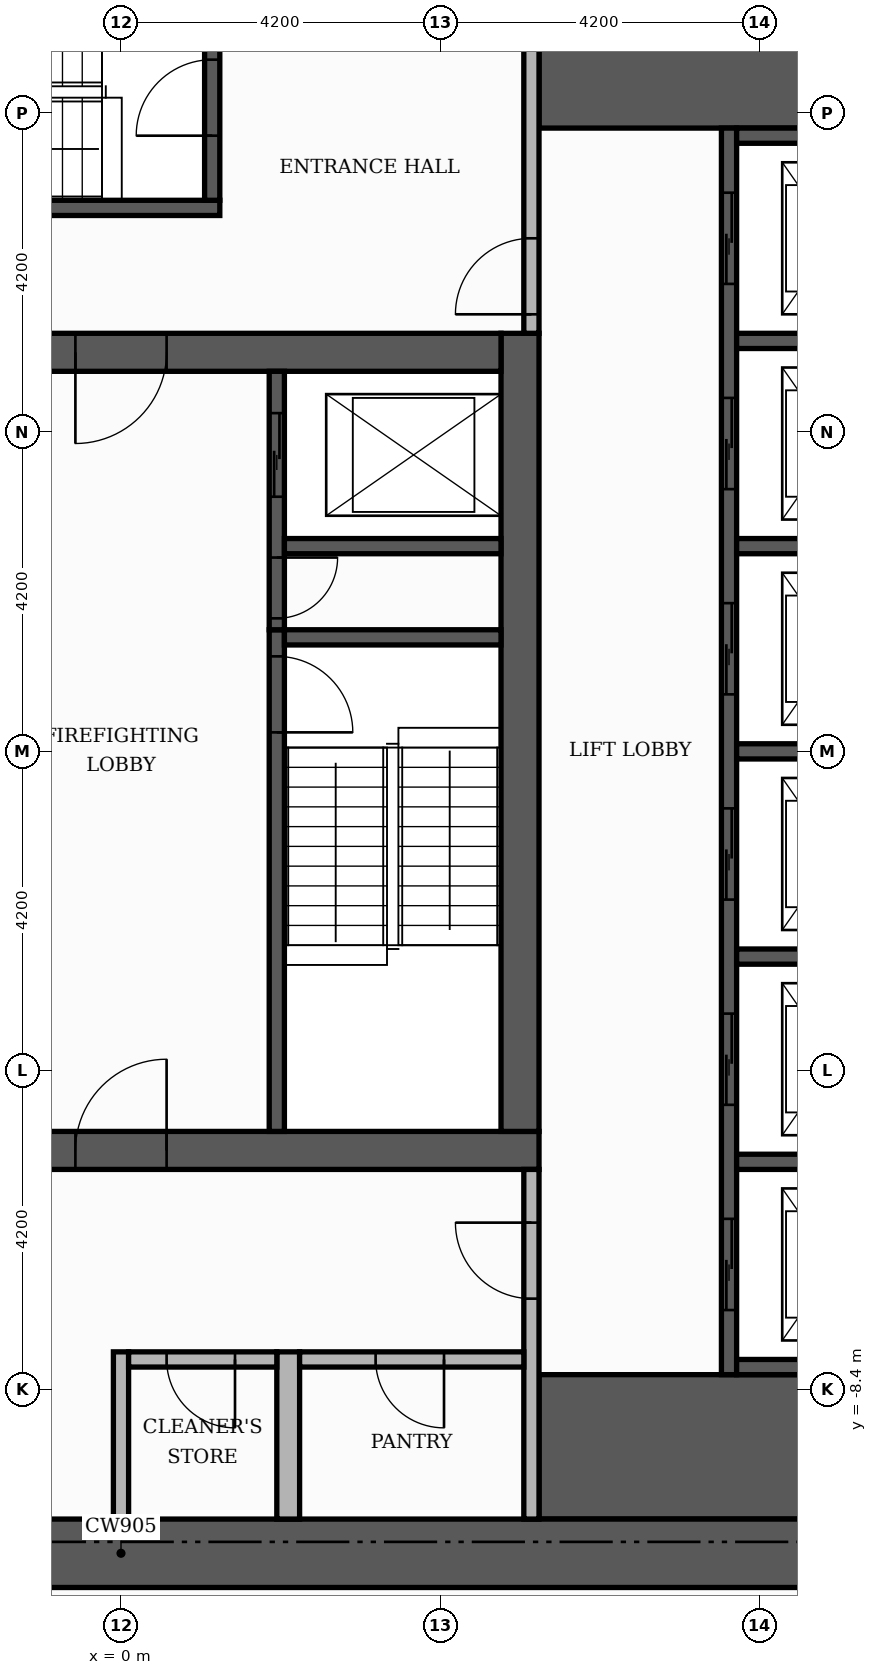
"""IFC4 building model, lengths in metres.
Left out: names, types, materials, properties, quantities, classifications, styles, units other than length and angle.
Written with IfcOpenShell. Run it as: python <this file> out.ifc"""

import sys

from ifc_helpers import new_model, si_unit, direction, frame, frame_2d, origin, place, context, subcontext, project, spatial, rectangle, extrude, element, fill, save


model = new_model("IFC4")
c1 = context("Model", 3, precision=1e-05, world=origin(), true_north=direction((0.0, 1.0)))
c2 = subcontext(c1, "Body", "Model", "MODEL_VIEW")
j1 = project(units=[si_unit("LENGTHUNIT", "METRE"), si_unit("PLANEANGLEUNIT", "RADIAN")], contexts=[c1])
p1 = place(None, origin())
s1 = spatial("IfcSite", under=j1, at=p1, CompositionType="ELEMENT")
p2 = place(p1, origin())
s2 = spatial("IfcBuilding", under=s1, at=p2, CompositionType="ELEMENT")
p3 = place(p2, frame((0.0, 0.0, 252.3)))
s3 = spatial("IfcBuildingStorey", under=s2, at=p3, CompositionType="ELEMENT", Elevation=252.3)
p4 = place(p3, frame((-5.5, -5.25, 0.0), z_axis=(0.0, 0.0, 1.0), x_axis=(1.0, 0.0, 0.0)))
e1 = element("IfcWall", 1, at=p4, inside=s3, PredefinedType="SHEAR", context=c2, shape_type="SweptSolid", body=[
    extrude(rectangle(XDim=11.0, YDim=0.5, at=frame_2d((5.5, 0.0))), origin(), (0.0, 0.0, 1.0), 3.48),
])
p5 = place(p4, frame((4.9, 0.0, 0.0)))
e2 = element("IfcOpeningElement", 2, at=p5, cuts=e1, PredefinedType="OPENING", context=c2, shape_type="SweptSolid", body=[
    extrude(rectangle(XDim=1.2, YDim=2.1, at=frame_2d((0.6, 1.05))), frame((0.0, 0.26, 0.0), z_axis=(0.0, -1.0, 0.0), x_axis=(1.0, 0.0, 0.0)), (0.0, 0.0, 1.0), 0.52),
])
p6 = place(p3, frame((5.25, -5.0, 0.0), z_axis=(0.0, 0.0, 1.0), x_axis=(0.0, 1.0, 0.0)))
e3 = element("IfcWall", 3, at=p6, inside=s3, PredefinedType="SHEAR", context=c2, shape_type="SweptSolid", body=[
    extrude(rectangle(XDim=10.5, YDim=0.5, at=frame_2d((5.25, 0.0))), origin(), (0.0, 0.0, 1.0), 3.48),
])
p7 = place(p3, frame((-5.0, 5.25, 0.0), z_axis=(0.0, 0.0, 1.0), x_axis=(1.0, 0.0, 0.0)))
e4 = element("IfcWall", 4, at=p7, inside=s3, PredefinedType="SHEAR", context=c2, shape_type="SweptSolid", body=[
    extrude(rectangle(XDim=10.0, YDim=0.5, at=frame_2d((5.0, 0.0))), origin(), (0.0, 0.0, 1.0), 3.48),
])
p8 = place(p7, frame((4.4, 0.0, 0.0)))
e5 = element("IfcOpeningElement", 5, at=p8, cuts=e4, PredefinedType="OPENING", context=c2, shape_type="SweptSolid", body=[
    extrude(rectangle(XDim=1.2, YDim=2.1, at=frame_2d((0.6, 1.05))), frame((0.0, 0.26, 0.0), z_axis=(0.0, -1.0, 0.0), x_axis=(1.0, 0.0, 0.0)), (0.0, 0.0, 1.0), 0.52),
])
for number, where, z_axis, x_axis in (
    (6, (5.5, -9.15, 0.0), (0.0, 0.0, 1.0), (1.0, 0.0, 0.0)),
    (7, (5.5, 9.15, 0.0), (0.0, 0.0, 1.0), (1.0, 0.0, 0.0)),
):
    element("IfcWall", number, at=place(p3, frame(where, z_axis=z_axis, x_axis=x_axis)), inside=s3, PredefinedType="SHEAR", context=c2, shape_type="SweptSolid", body=[
        extrude(rectangle(XDim=4.6, YDim=1.9, at=frame_2d((2.3, 0.0))), origin(), (0.0, 0.0, 1.0), 3.48),
    ])
p9 = place(p3, frame((2.05, -5.0, 0.0), z_axis=(0.0, 0.0, 1.0), x_axis=(0.0, 1.0, 0.0)))
e8 = element("IfcWall", 8, at=p9, inside=s3, PredefinedType="SHEAR", context=c2, shape_type="SweptSolid", body=[
    extrude(rectangle(XDim=6.6, YDim=0.2, at=frame_2d((3.3, 0.0))), origin(), (0.0, 0.0, 1.0), 3.48),
])
p10 = place(p9, frame((5.25, 0.0, 0.0)))
e9 = element("IfcOpeningElement", 9, at=p10, cuts=e8, PredefinedType="OPENING", context=c2, shape_type="SweptSolid", body=[
    extrude(rectangle(XDim=1.0, YDim=2.1, at=frame_2d((0.5, 1.05))), frame((0.0, 0.11, 0.0), z_axis=(0.0, -1.0, 0.0), x_axis=(1.0, 0.0, 0.0)), (0.0, 0.0, 1.0), 0.22),
])
p11 = place(p3, frame((2.15, 1.5, 0.0), z_axis=(0.0, 0.0, 1.0), x_axis=(1.0, 0.0, 0.0)))
e10 = element("IfcWall", 10, at=p11, inside=s3, PredefinedType="SHEAR", context=c2, shape_type="SweptSolid", body=[
    extrude(rectangle(XDim=2.85, YDim=0.2, at=frame_2d((1.425, 0.0))), origin(), (0.0, 0.0, 1.0), 3.48),
])
p12 = place(p3, frame((-5.5, 7.15, 0.0), z_axis=(0.0, 0.0, 1.0), x_axis=(1.0, 0.0, 0.0)))
e11 = element("IfcWall", 11, at=p12, inside=s3, PredefinedType="SHEAR", context=c2, shape_type="SweptSolid", body=[
    extrude(rectangle(XDim=6.8, YDim=0.2, at=frame_2d((3.4, 0.0))), origin(), (0.0, 0.0, 1.0), 3.48),
])
p13 = place(p3, frame((1.2, 7.25, 0.0), z_axis=(0.0, 0.0, 1.0), x_axis=(0.0, 1.0, 0.0)))
e12 = element("IfcWall", 12, at=p13, inside=s3, PredefinedType="SHEAR", context=c2, shape_type="SweptSolid", body=[
    extrude(rectangle(XDim=2.85, YDim=0.2, at=frame_2d((1.425, 0.0))), origin(), (0.0, 0.0, 1.0), 3.48),
])
p14 = place(p13, frame((0.85, 0.0, 0.0)))
e13 = element("IfcOpeningElement", 13, at=p14, cuts=e12, PredefinedType="OPENING", context=c2, shape_type="SweptSolid", body=[
    extrude(rectangle(XDim=1.0, YDim=2.1, at=frame_2d((0.5, 1.05))), frame((0.0, 0.11, 0.0), z_axis=(0.0, -1.0, 0.0), x_axis=(1.0, 0.0, 0.0)), (0.0, 0.0, 1.0), 0.22),
])
p15 = place(p3, frame((8.0, -8.2, 0.0), z_axis=(0.0, 0.0, 1.0), x_axis=(0.0, 1.0, 0.0)))
e14 = element("IfcWall", 14, at=p15, inside=s3, PredefinedType="SHEAR", context=c2, shape_type="SweptSolid", body=[
    extrude(rectangle(XDim=16.4, YDim=0.2, at=frame_2d((8.2, 0.0))), origin(), (0.0, 0.0, 1.0), 3.48),
])
p16 = place(p15, frame((0.85, 0.0, 0.0)))
e15 = element("IfcOpeningElement", 15, at=p16, cuts=e14, PredefinedType="OPENING", context=c2, shape_type="SweptSolid", body=[
    extrude(rectangle(XDim=1.2, YDim=2.1, at=frame_2d((0.6, 1.05))), frame((0.0, 0.11, 0.0), z_axis=(0.0, -1.0, 0.0), x_axis=(1.0, 0.0, 0.0)), (0.0, 0.0, 1.0), 0.22),
])
p17 = place(p15, frame((3.55, 0.0, 0.0)))
e16 = element("IfcOpeningElement", 16, at=p17, cuts=e14, PredefinedType="OPENING", context=c2, shape_type="SweptSolid", body=[
    extrude(rectangle(XDim=1.2, YDim=2.1, at=frame_2d((0.6, 1.05))), frame((0.0, 0.11, 0.0), z_axis=(0.0, -1.0, 0.0), x_axis=(1.0, 0.0, 0.0)), (0.0, 0.0, 1.0), 0.22),
])
p18 = place(p15, frame((6.25, 0.0, 0.0)))
e17 = element("IfcOpeningElement", 17, at=p18, cuts=e14, PredefinedType="OPENING", context=c2, shape_type="SweptSolid", body=[
    extrude(rectangle(XDim=1.2, YDim=2.1, at=frame_2d((0.6, 1.05))), frame((0.0, 0.11, 0.0), z_axis=(0.0, -1.0, 0.0), x_axis=(1.0, 0.0, 0.0)), (0.0, 0.0, 1.0), 0.22),
])
p19 = place(p15, frame((8.95, 0.0, 0.0)))
e18 = element("IfcOpeningElement", 18, at=p19, cuts=e14, PredefinedType="OPENING", context=c2, shape_type="SweptSolid", body=[
    extrude(rectangle(XDim=1.2, YDim=2.1, at=frame_2d((0.6, 1.05))), frame((0.0, 0.11, 0.0), z_axis=(0.0, -1.0, 0.0), x_axis=(1.0, 0.0, 0.0)), (0.0, 0.0, 1.0), 0.22),
])
p20 = place(p15, frame((11.65, 0.0, 0.0)))
e19 = element("IfcOpeningElement", 19, at=p20, cuts=e14, PredefinedType="OPENING", context=c2, shape_type="SweptSolid", body=[
    extrude(rectangle(XDim=1.2, YDim=2.1, at=frame_2d((0.6, 1.05))), frame((0.0, 0.11, 0.0), z_axis=(0.0, -1.0, 0.0), x_axis=(1.0, 0.0, 0.0)), (0.0, 0.0, 1.0), 0.22),
])
p21 = place(p15, frame((14.35, 0.0, 0.0)))
e20 = element("IfcOpeningElement", 20, at=p21, cuts=e14, PredefinedType="OPENING", context=c2, shape_type="SweptSolid", body=[
    extrude(rectangle(XDim=1.2, YDim=2.1, at=frame_2d((0.6, 1.05))), frame((0.0, 0.11, 0.0), z_axis=(0.0, -1.0, 0.0), x_axis=(1.0, 0.0, 0.0)), (0.0, 0.0, 1.0), 0.22),
])
for number, where, z_axis, x_axis in (
    (21, (8.1, -8.1, 0.0), (0.0, 0.0, 1.0), (1.0, 0.0, 0.0)),
    (22, (8.1, -5.4, 0.0), (0.0, 0.0, 1.0), (1.0, 0.0, 0.0)),
    (23, (8.1, -2.7, 0.0), (0.0, 0.0, 1.0), (1.0, 0.0, 0.0)),
    (24, (8.1, 0.0, 0.0), (0.0, 0.0, 1.0), (1.0, 0.0, 0.0)),
):
    element("IfcWall", number, at=place(p3, frame(where, z_axis=z_axis, x_axis=x_axis)), inside=s3, PredefinedType="SHEAR", context=c2, shape_type="SweptSolid", body=[
        extrude(rectangle(XDim=2.0, YDim=0.2, at=frame_2d((1.0, 0.0))), origin(), (0.0, 0.0, 1.0), 3.48),
    ])
p22 = place(p3, frame((2.05, 1.6, 0.0), z_axis=(0.0, 0.0, 1.0), x_axis=(0.0, 1.0, 0.0)))
e25 = element("IfcWall", 25, at=p22, inside=s3, PredefinedType="SHEAR", context=c2, shape_type="SweptSolid", body=[
    extrude(rectangle(XDim=3.4, YDim=0.2, at=frame_2d((1.7, 0.0))), origin(), (0.0, 0.0, 1.0), 3.48),
])
p23 = place(p22, frame((1.75, 0.0, 0.0)))
e26 = element("IfcOpeningElement", 26, at=p23, cuts=e25, PredefinedType="OPENING", context=c2, shape_type="SweptSolid", body=[
    extrude(rectangle(XDim=1.1, YDim=2.1, at=frame_2d((0.55, 1.05))), frame((0.0, 0.11, 0.0), z_axis=(0.0, -1.0, 0.0), x_axis=(1.0, 0.0, 0.0)), (0.0, 0.0, 1.0), 0.22),
])
p24 = place(p22, frame((0.15, 0.0, 0.0)))
e27 = element("IfcOpeningElement", 27, at=p24, cuts=e25, PredefinedType="OPENING", context=c2, shape_type="SweptSolid", body=[
    extrude(rectangle(XDim=0.8, YDim=2.1, at=frame_2d((0.4, 1.05))), frame((0.0, 0.11, 0.0), z_axis=(0.0, -1.0, 0.0), x_axis=(1.0, 0.0, 0.0)), (0.0, 0.0, 1.0), 0.22),
])
p25 = place(p3, frame((2.15, 2.7, 0.0), z_axis=(0.0, 0.0, 1.0), x_axis=(1.0, 0.0, 0.0)))
e28 = element("IfcWall", 28, at=p25, inside=s3, PredefinedType="SHEAR", context=c2, shape_type="SweptSolid", body=[
    extrude(rectangle(XDim=2.85, YDim=0.2, at=frame_2d((1.425, 0.0))), origin(), (0.0, 0.0, 1.0), 3.48),
])
for number, where, z_axis, x_axis in (
    (29, (8.1, 2.7, 0.0), (0.0, 0.0, 1.0), (1.0, 0.0, 0.0)),
    (30, (8.1, 5.4, 0.0), (0.0, 0.0, 1.0), (1.0, 0.0, 0.0)),
    (31, (8.1, 8.1, 0.0), (0.0, 0.0, 1.0), (1.0, 0.0, 0.0)),
):
    element("IfcWall", number, at=place(p3, frame(where, z_axis=z_axis, x_axis=x_axis)), inside=s3, PredefinedType="SHEAR", context=c2, shape_type="SweptSolid", body=[
        extrude(rectangle(XDim=2.0, YDim=0.2, at=frame_2d((1.0, 0.0))), origin(), (0.0, 0.0, 1.0), 3.48),
    ])
p26 = place(p3, frame((-11.0, -10.55, 0.0), z_axis=(0.0, 0.0, 1.0), x_axis=(1.0, 0.0, 0.0)))
e32 = element("IfcWall", 32, at=p26, inside=s3, PredefinedType="SHEAR", context=c2, shape_type="SweptSolid", body=[
    extrude(rectangle(XDim=22.0, YDim=0.9, at=frame_2d((11.0, 0.0))), origin(), (0.0, 0.0, 1.0), 3.48),
])
p27 = place(p26, frame((7.4, 0.0, 0.0)))
e33 = element("IfcOpeningElement", 33, at=p27, cuts=e32, PredefinedType="OPENING", context=c2, shape_type="SweptSolid", body=[
    extrude(rectangle(XDim=1.8, YDim=2.2, at=frame_2d((0.9, 1.1))), frame((0.0, 0.46, 0.0), z_axis=(0.0, -1.0, 0.0), x_axis=(1.0, 0.0, 0.0)), (0.0, 0.0, 1.0), 0.92),
])
p28 = place(p3, frame((0.0, -10.1, 0.0), z_axis=(0.0, 0.0, 1.0), x_axis=(0.0, 1.0, 0.0)))
e34 = element("IfcWall", 34, at=p28, inside=s3, PredefinedType="PARTITIONING", context=c2, shape_type="SweptSolid", body=[
    extrude(rectangle(XDim=2.2, YDim=0.2, at=frame_2d((1.1, 0.0))), origin(), (0.0, 0.0, 1.0), 3.48),
])
p29 = place(p3, frame((2.2, -10.1, 0.0), z_axis=(0.0, 0.0, 1.0), x_axis=(0.0, 1.0, 0.0)))
e35 = element("IfcWall", 35, at=p29, inside=s3, PredefinedType="PARTITIONING", context=c2, shape_type="SweptSolid", body=[
    extrude(rectangle(XDim=2.2, YDim=0.3, at=frame_2d((1.1, 0.0))), origin(), (0.0, 0.0, 1.0), 3.48),
])
p30 = place(p3, frame((5.4, -10.1, 0.0), z_axis=(0.0, 0.0, 1.0), x_axis=(0.0, 1.0, 0.0)))
e36 = element("IfcWall", 36, at=p30, inside=s3, PredefinedType="PARTITIONING", context=c2, shape_type="SweptSolid", body=[
    extrude(rectangle(XDim=4.6, YDim=0.2, at=frame_2d((2.3, 0.0))), origin(), (0.0, 0.0, 1.0), 3.48),
])
p31 = place(p30, frame((2.9, 0.0, 0.0)))
e37 = element("IfcOpeningElement", 37, at=p31, cuts=e36, PredefinedType="OPENING", context=c2, shape_type="SweptSolid", body=[
    extrude(rectangle(XDim=1.0, YDim=2.1, at=frame_2d((0.5, 1.05))), frame((0.0, 0.11, 0.0), z_axis=(0.0, -1.0, 0.0), x_axis=(1.0, 0.0, 0.0)), (0.0, 0.0, 1.0), 0.22),
])
p32 = place(p3, frame((0.1, -8.0, 0.0), z_axis=(0.0, 0.0, 1.0), x_axis=(1.0, 0.0, 0.0)))
e38 = element("IfcWall", 38, at=p32, inside=s3, PredefinedType="PARTITIONING", context=c2, shape_type="SweptSolid", body=[
    extrude(rectangle(XDim=1.95, YDim=0.2, at=frame_2d((0.975, 0.0))), origin(), (0.0, 0.0, 1.0), 3.48),
])
p33 = place(p32, frame((0.5, 0.0, 0.0)))
e39 = element("IfcOpeningElement", 39, at=p33, cuts=e38, PredefinedType="OPENING", context=c2, shape_type="SweptSolid", body=[
    extrude(rectangle(XDim=0.9, YDim=2.1, at=frame_2d((0.45, 1.05))), frame((0.0, 0.11, 0.0), z_axis=(0.0, -1.0, 0.0), x_axis=(1.0, 0.0, 0.0)), (0.0, 0.0, 1.0), 0.22),
])
p34 = place(p3, frame((2.35, -8.0, 0.0), z_axis=(0.0, 0.0, 1.0), x_axis=(1.0, 0.0, 0.0)))
e40 = element("IfcWall", 40, at=p34, inside=s3, PredefinedType="PARTITIONING", context=c2, shape_type="SweptSolid", body=[
    extrude(rectangle(XDim=2.95, YDim=0.2, at=frame_2d((1.475, 0.0))), origin(), (0.0, 0.0, 1.0), 3.48),
])
p35 = place(p34, frame((1.0, 0.0, 0.0)))
e41 = element("IfcOpeningElement", 41, at=p35, cuts=e40, PredefinedType="OPENING", context=c2, shape_type="SweptSolid", body=[
    extrude(rectangle(XDim=0.9, YDim=2.1, at=frame_2d((0.45, 1.05))), frame((0.0, 0.11, 0.0), z_axis=(0.0, -1.0, 0.0), x_axis=(1.0, 0.0, 0.0)), (0.0, 0.0, 1.0), 0.22),
])
p36 = place(p3, frame((5.4, 5.5, 0.0), z_axis=(0.0, 0.0, 1.0), x_axis=(0.0, 1.0, 0.0)))
e42 = element("IfcWall", 42, at=p36, inside=s3, PredefinedType="PARTITIONING", context=c2, shape_type="SweptSolid", body=[
    extrude(rectangle(XDim=4.6, YDim=0.2, at=frame_2d((2.3, 0.0))), origin(), (0.0, 0.0, 1.0), 3.48),
])
p37 = place(p36, frame((0.25, 0.0, 0.0)))
e43 = element("IfcOpeningElement", 43, at=p37, cuts=e42, PredefinedType="OPENING", context=c2, shape_type="SweptSolid", body=[
    extrude(rectangle(XDim=1.0, YDim=2.1, at=frame_2d((0.5, 1.05))), frame((0.0, 0.11, 0.0), z_axis=(0.0, -1.0, 0.0), x_axis=(1.0, 0.0, 0.0)), (0.0, 0.0, 1.0), 0.22),
])
p38 = place(p16, origin())
e44 = element("IfcDoor", 44, at=p38, inside=s3, OperationType="SLIDING_TO_LEFT", PredefinedType="DOOR", context=c2, shape_type="SweptSolid", body=[
    extrude(rectangle(XDim=1.2, YDim=2.1, at=frame_2d((0.6, 1.05))), frame((0.0, 0.025, 0.0), z_axis=(0.0, -1.0, 0.0), x_axis=(1.0, 0.0, 0.0)), (0.0, 0.0, 1.0), 0.05),
])
fill(e15, e44)
p39 = place(p17, origin())
e45 = element("IfcDoor", 45, at=p39, inside=s3, OperationType="SLIDING_TO_LEFT", PredefinedType="DOOR", context=c2, shape_type="SweptSolid", body=[
    extrude(rectangle(XDim=1.2, YDim=2.1, at=frame_2d((0.6, 1.05))), frame((0.0, 0.025, 0.0), z_axis=(0.0, -1.0, 0.0), x_axis=(1.0, 0.0, 0.0)), (0.0, 0.0, 1.0), 0.05),
])
fill(e16, e45)
p40 = place(p18, origin())
e46 = element("IfcDoor", 46, at=p40, inside=s3, OperationType="SLIDING_TO_LEFT", PredefinedType="DOOR", context=c2, shape_type="SweptSolid", body=[
    extrude(rectangle(XDim=1.2, YDim=2.1, at=frame_2d((0.6, 1.05))), frame((0.0, 0.025, 0.0), z_axis=(0.0, -1.0, 0.0), x_axis=(1.0, 0.0, 0.0)), (0.0, 0.0, 1.0), 0.05),
])
fill(e17, e46)
p41 = place(p19, origin())
e47 = element("IfcDoor", 47, at=p41, inside=s3, OperationType="SLIDING_TO_LEFT", PredefinedType="DOOR", context=c2, shape_type="SweptSolid", body=[
    extrude(rectangle(XDim=1.2, YDim=2.1, at=frame_2d((0.6, 1.05))), frame((0.0, 0.025, 0.0), z_axis=(0.0, -1.0, 0.0), x_axis=(1.0, 0.0, 0.0)), (0.0, 0.0, 1.0), 0.05),
])
fill(e18, e47)
p42 = place(p20, origin())
e48 = element("IfcDoor", 48, at=p42, inside=s3, OperationType="SLIDING_TO_LEFT", PredefinedType="DOOR", context=c2, shape_type="SweptSolid", body=[
    extrude(rectangle(XDim=1.2, YDim=2.1, at=frame_2d((0.6, 1.05))), frame((0.0, 0.025, 0.0), z_axis=(0.0, -1.0, 0.0), x_axis=(1.0, 0.0, 0.0)), (0.0, 0.0, 1.0), 0.05),
])
fill(e19, e48)
p43 = place(p21, origin())
e49 = element("IfcDoor", 49, at=p43, inside=s3, OperationType="SLIDING_TO_LEFT", PredefinedType="DOOR", context=c2, shape_type="SweptSolid", body=[
    extrude(rectangle(XDim=1.2, YDim=2.1, at=frame_2d((0.6, 1.05))), frame((0.0, 0.025, 0.0), z_axis=(0.0, -1.0, 0.0), x_axis=(1.0, 0.0, 0.0)), (0.0, 0.0, 1.0), 0.05),
])
fill(e20, e49)
p44 = place(p23, origin())
e50 = element("IfcDoor", 50, at=p44, inside=s3, OperationType="SLIDING_TO_LEFT", PredefinedType="DOOR", context=c2, shape_type="SweptSolid", body=[
    extrude(rectangle(XDim=1.1, YDim=2.1, at=frame_2d((0.55, 1.05))), frame((0.0, 0.025, 0.0), z_axis=(0.0, -1.0, 0.0), x_axis=(1.0, 0.0, 0.0)), (0.0, 0.0, 1.0), 0.05),
])
fill(e26, e50)
p45 = place(p10, frame((1.0, 0.0, 0.0), z_axis=(0.0, 0.0, 1.0), x_axis=(-1.0, 0.0, 0.0)))
e51 = element("IfcDoor", 51, at=p45, inside=s3, OperationType="SINGLE_SWING_LEFT", PredefinedType="DOOR", context=c2, shape_type="SweptSolid", body=[
    extrude(rectangle(XDim=1.0, YDim=2.1, at=frame_2d((0.5, 1.05))), frame((0.0, 0.025, 0.0), z_axis=(0.0, -1.0, 0.0), x_axis=(1.0, 0.0, 0.0)), (0.0, 0.0, 1.0), 0.05),
])
fill(e9, e51)
p46 = place(p24, frame((0.8, 0.0, 0.0), z_axis=(0.0, 0.0, 1.0), x_axis=(-1.0, 0.0, 0.0)))
e52 = element("IfcDoor", 52, at=p46, inside=s3, OperationType="SINGLE_SWING_RIGHT", PredefinedType="DOOR", context=c2, shape_type="SweptSolid", body=[
    extrude(rectangle(XDim=0.8, YDim=2.1, at=frame_2d((0.4, 1.05))), frame((0.0, 0.025, 0.0), z_axis=(0.0, -1.0, 0.0), x_axis=(1.0, 0.0, 0.0)), (0.0, 0.0, 1.0), 0.05),
])
fill(e27, e52)
p47 = place(p8, frame((1.2, 0.0, 0.0), z_axis=(0.0, 0.0, 1.0), x_axis=(-1.0, 0.0, 0.0)))
e53 = element("IfcDoor", 53, at=p47, inside=s3, OperationType="SINGLE_SWING_LEFT", PredefinedType="DOOR", context=c2, shape_type="SweptSolid", body=[
    extrude(rectangle(XDim=1.2, YDim=2.1, at=frame_2d((0.6, 1.05))), frame((0.0, 0.025, 0.0), z_axis=(0.0, -1.0, 0.0), x_axis=(1.0, 0.0, 0.0)), (0.0, 0.0, 1.0), 0.05),
])
fill(e5, e53)
p48 = place(p5, origin())
e54 = element("IfcDoor", 54, at=p48, inside=s3, OperationType="SINGLE_SWING_RIGHT", PredefinedType="DOOR", context=c2, shape_type="SweptSolid", body=[
    extrude(rectangle(XDim=1.2, YDim=2.1, at=frame_2d((0.6, 1.05))), frame((0.0, 0.025, 0.0), z_axis=(0.0, -1.0, 0.0), x_axis=(1.0, 0.0, 0.0)), (0.0, 0.0, 1.0), 0.05),
])
fill(e2, e54)
p49 = place(p14, origin())
e55 = element("IfcDoor", 55, at=p49, inside=s3, OperationType="SINGLE_SWING_LEFT", PredefinedType="DOOR", context=c2, shape_type="SweptSolid", body=[
    extrude(rectangle(XDim=1.0, YDim=2.1, at=frame_2d((0.5, 1.05))), frame((0.0, 0.025, 0.0), z_axis=(0.0, -1.0, 0.0), x_axis=(1.0, 0.0, 0.0)), (0.0, 0.0, 1.0), 0.05),
])
fill(e13, e55)
p50 = place(p37, origin())
e56 = element("IfcDoor", 56, at=p50, inside=s3, OperationType="SINGLE_SWING_LEFT", PredefinedType="DOOR", context=c2, shape_type="SweptSolid", body=[
    extrude(rectangle(XDim=1.0, YDim=2.1, at=frame_2d((0.5, 1.05))), frame((0.0, 0.025, 0.0), z_axis=(0.0, -1.0, 0.0), x_axis=(1.0, 0.0, 0.0)), (0.0, 0.0, 1.0), 0.05),
])
fill(e43, e56)
p51 = place(p31, origin())
e57 = element("IfcDoor", 57, at=p51, inside=s3, OperationType="SINGLE_SWING_RIGHT", PredefinedType="DOOR", context=c2, shape_type="SweptSolid", body=[
    extrude(rectangle(XDim=1.0, YDim=2.1, at=frame_2d((0.5, 1.05))), frame((0.0, 0.025, 0.0), z_axis=(0.0, -1.0, 0.0), x_axis=(1.0, 0.0, 0.0)), (0.0, 0.0, 1.0), 0.05),
])
fill(e37, e57)
p52 = place(p33, frame((0.9, 0.0, 0.0), z_axis=(0.0, 0.0, 1.0), x_axis=(-1.0, 0.0, 0.0)))
e58 = element("IfcDoor", 58, at=p52, inside=s3, OperationType="SINGLE_SWING_RIGHT", PredefinedType="DOOR", context=c2, shape_type="SweptSolid", body=[
    extrude(rectangle(XDim=0.9, YDim=2.1, at=frame_2d((0.45, 1.05))), frame((0.0, 0.025, 0.0), z_axis=(0.0, -1.0, 0.0), x_axis=(1.0, 0.0, 0.0)), (0.0, 0.0, 1.0), 0.05),
])
fill(e39, e58)
p53 = place(p35, frame((0.9, 0.0, 0.0), z_axis=(0.0, 0.0, 1.0), x_axis=(-1.0, 0.0, 0.0)))
e59 = element("IfcDoor", 59, at=p53, inside=s3, OperationType="SINGLE_SWING_RIGHT", PredefinedType="DOOR", context=c2, shape_type="SweptSolid", body=[
    extrude(rectangle(XDim=0.9, YDim=2.1, at=frame_2d((0.45, 1.05))), frame((0.0, 0.025, 0.0), z_axis=(0.0, -1.0, 0.0), x_axis=(1.0, 0.0, 0.0)), (0.0, 0.0, 1.0), 0.05),
])
fill(e41, e59)
save(model, sys.argv[1])
